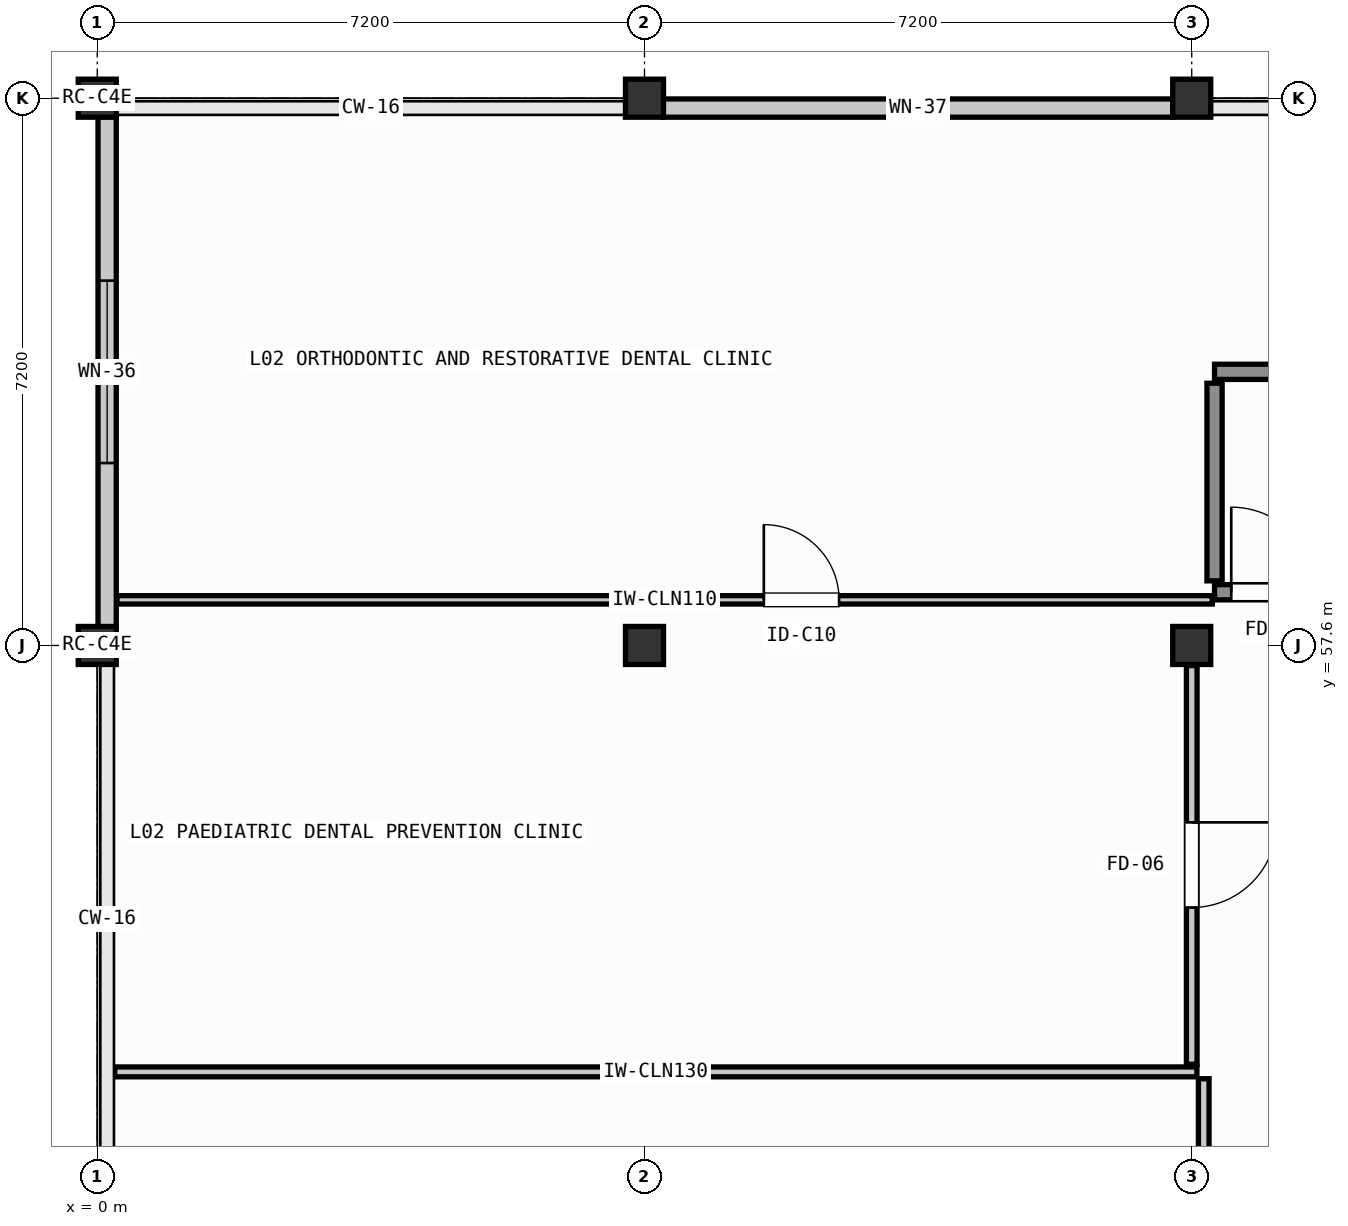
"""IFC4 building model, lengths in metres.
Left out: names, types, materials, properties, quantities, classifications, styles, units other than length and angle.
Written with IfcOpenShell. Run it as: python <this file> out.ifc"""

import sys

from ifc_helpers import new_model, si_unit, direction, frame, frame_2d, origin, origin_2d, place, context, subcontext, project, spatial, rectangle, extrude, element, fill, save


model = new_model("IFC4")
c1 = context("Model", 3, precision=1e-05, world=origin(), true_north=direction((0.0, 1.0)))
c2 = subcontext(c1, "Body", "Model", "MODEL_VIEW")
j1 = project(units=[si_unit("LENGTHUNIT", "METRE"), si_unit("PLANEANGLEUNIT", "RADIAN")], contexts=[c1])
p1 = place(None, origin())
s1 = spatial("IfcSite", under=j1, at=p1, CompositionType="ELEMENT")
p2 = place(p1, origin())
s2 = spatial("IfcBuilding", under=s1, at=p2, CompositionType="ELEMENT")
p3 = place(p2, frame((0.0, 0.0, 4.8)))
s3 = spatial("IfcBuildingStorey", under=s2, at=p3, CompositionType="ELEMENT", Elevation=4.8)
for number, where, z_axis, x_axis in (
    (1, (0.0, 57.6, 0.0), (0.0, 0.0, 1.0), (1.0, 0.0, 0.0)),
    (2, (0.0, 64.8, 0.0), (0.0, 0.0, 1.0), (1.0, 0.0, 0.0)),
    (3, (7.2, 57.6, 0.0), (0.0, 0.0, 1.0), (1.0, 0.0, 0.0)),
    (4, (7.2, 64.8, 0.0), (0.0, 0.0, 1.0), (1.0, 0.0, 0.0)),
    (5, (14.4, 57.6, 0.0), (0.0, 0.0, 1.0), (1.0, 0.0, 0.0)),
    (6, (14.4, 64.8, 0.0), (0.0, 0.0, 1.0), (1.0, 0.0, 0.0)),
):
    element("IfcColumn", number, at=place(p3, frame(where, z_axis=z_axis, x_axis=x_axis)), inside=s3, PredefinedType="COLUMN", context=c2, shape_type="SweptSolid", body=[
        extrude(rectangle(XDim=0.5, YDim=0.5, at=origin_2d()), origin(), (0.0, 0.0, 1.0), 4.2),
    ])
p4 = place(p3, frame((0.13, 57.845, 0.0), z_axis=(0.0, 0.0, 1.0), x_axis=(0.0, 1.0, 0.0)))
e7 = element("IfcWall", 7, at=p4, inside=s3, PredefinedType="SOLIDWALL", context=c2, shape_type="SweptSolid", body=[
    extrude(rectangle(XDim=6.71, YDim=0.24, at=frame_2d((3.355, 0.0))), origin(), (0.0, 0.0, 1.0), 3.4),
])
p5 = place(p4, frame((2.155, 0.0, 0.95)))
e8 = element("IfcOpeningElement", 8, at=p5, cuts=e7, PredefinedType="OPENING", context=c2, shape_type="SweptSolid", body=[
    extrude(rectangle(XDim=2.4, YDim=1.25, at=frame_2d((1.2, 0.625))), frame((0.0, 0.13, 0.0), z_axis=(0.0, -1.0, 0.0), x_axis=(1.0, 0.0, 0.0)), (0.0, 0.0, 1.0), 0.26),
])
p6 = place(p3, frame((7.445, 64.67, 0.0), z_axis=(0.0, 0.0, 1.0), x_axis=(1.0, 0.0, 0.0)))
e9 = element("IfcWall", 9, at=p6, inside=s3, PredefinedType="SOLIDWALL", context=c2, shape_type="SweptSolid", body=[
    extrude(rectangle(XDim=6.71, YDim=0.24, at=frame_2d((3.355, 0.0))), origin(), (0.0, 0.0, 1.0), 3.4),
])
p7 = place(p6, frame((2.98, 0.0, 0.95)))
e10 = element("IfcOpeningElement", 10, at=p7, cuts=e9, PredefinedType="OPENING", context=c2, shape_type="SweptSolid", body=[
    extrude(rectangle(XDim=0.75, YDim=1.55, at=frame_2d((0.375, 0.775))), frame((0.0, 0.13, 0.0), z_axis=(0.0, -1.0, 0.0), x_axis=(1.0, 0.0, 0.0)), (0.0, 0.0, 1.0), 0.26),
])
p8 = place(p3, frame((14.7, 58.3, 0.0), z_axis=(0.0, 0.0, 1.0), x_axis=(1.0, 0.0, 0.0)))
e11 = element("IfcWall", 11, at=p8, inside=s3, PredefinedType="SHEAR", context=c2, shape_type="SweptSolid", body=[
    extrude(rectangle(XDim=6.775, YDim=0.2, at=frame_2d((3.388, 0.0))), origin(), (0.0, 0.0, 1.0), 4.5),
])
p9 = place(p8, frame((0.22, 0.0, 0.0)))
e12 = element("IfcOpeningElement", 12, at=p9, cuts=e11, PredefinedType="OPENING", context=c2, shape_type="SweptSolid", body=[
    extrude(rectangle(XDim=1.12, YDim=2.14, at=frame_2d((0.56, 1.07))), frame((0.0, 0.11, 0.0), z_axis=(0.0, -1.0, 0.0), x_axis=(1.0, 0.0, 0.0)), (0.0, 0.0, 1.0), 0.22),
])
p10 = place(p3, frame((14.7, 61.2, 0.0), z_axis=(0.0, 0.0, 1.0), x_axis=(1.0, 0.0, 0.0)))
e13 = element("IfcWall", 13, at=p10, inside=s3, PredefinedType="SHEAR", context=c2, shape_type="SweptSolid", body=[
    extrude(rectangle(XDim=6.775, YDim=0.2, at=frame_2d((3.388, 0.0))), origin(), (0.0, 0.0, 1.0), 4.5),
])
p11 = place(p3, frame((14.7, 58.45, 0.0), z_axis=(0.0, 0.0, 1.0), x_axis=(0.0, 1.0, 0.0)))
e14 = element("IfcWall", 14, at=p11, inside=s3, PredefinedType="SHEAR", context=c2, shape_type="SweptSolid", body=[
    extrude(rectangle(XDim=2.6, YDim=0.2, at=frame_2d((1.3, 0.0))), origin(), (0.0, 0.0, 1.0), 4.5),
])
p12 = place(p3, frame((0.23, 51.99, 0.0), z_axis=(0.0, 0.0, 1.0), x_axis=(1.0, 0.0, 0.0)))
e15 = element("IfcWall", 15, at=p12, inside=s3, PredefinedType="PARTITIONING", context=c2, shape_type="SweptSolid", body=[
    extrude(rectangle(XDim=14.238, YDim=0.13, at=frame_2d((7.119, 0.0))), origin(), (0.0, 0.0, 1.0), 3.5),
])
p13 = place(p3, frame((14.558, 51.9, 0.0), z_axis=(0.0, 0.0, 1.0), x_axis=(0.0, -1.0, 0.0)))
e16 = element("IfcWall", 16, at=p13, inside=s3, PredefinedType="PARTITIONING", context=c2, shape_type="SweptSolid", body=[
    extrude(rectangle(XDim=1.235, YDim=0.14, at=frame_2d((0.617, 0.0))), origin(), (0.0, 0.0, 1.0), 3.4),
])
p14 = place(p3, frame((0.26, 58.2, 0.0), z_axis=(0.0, 0.0, 1.0), x_axis=(1.0, 0.0, 0.0)))
e17 = element("IfcWall", 17, at=p14, inside=s3, PredefinedType="PARTITIONING", context=c2, shape_type="SweptSolid", body=[
    extrude(rectangle(XDim=14.41, YDim=0.11, at=frame_2d((7.205, 0.0))), origin(), (0.0, 0.0, 1.0), 3.5),
])
p15 = place(p14, frame((8.51, 0.0, 0.0)))
e18 = element("IfcOpeningElement", 18, at=p15, cuts=e17, PredefinedType="OPENING", context=c2, shape_type="SweptSolid", body=[
    extrude(rectangle(XDim=0.99, YDim=2.12, at=frame_2d((0.495, 1.06))), frame((0.0, 0.065, 0.0), z_axis=(0.0, -1.0, 0.0), x_axis=(1.0, 0.0, 0.0)), (0.0, 0.0, 1.0), 0.13),
])
p16 = place(p3, frame((14.4, 57.335, 0.0), z_axis=(0.0, 0.0, 1.0), x_axis=(0.0, -1.0, 0.0)))
e19 = element("IfcWall", 19, at=p16, inside=s3, PredefinedType="PARTITIONING", context=c2, shape_type="SweptSolid", body=[
    extrude(rectangle(XDim=5.245, YDim=0.14, at=frame_2d((2.623, 0.0))), origin(), (0.0, 0.0, 1.0), 3.4),
])
p17 = place(p16, frame((2.062, 0.0, 0.0)))
e20 = element("IfcOpeningElement", 20, at=p17, cuts=e19, PredefinedType="OPENING", context=c2, shape_type="SweptSolid", body=[
    extrude(rectangle(XDim=1.12, YDim=2.14, at=frame_2d((0.56, 1.07))), frame((0.0, 0.08, 0.0), z_axis=(0.0, -1.0, 0.0), x_axis=(1.0, 0.0, 0.0)), (0.0, 0.0, 1.0), 0.16),
])
p18 = place(p5, origin())
e21 = element("IfcWindow", 21, at=p18, inside=s3, PartitioningType="SINGLE_PANEL", PredefinedType="WINDOW", context=c2, shape_type="SweptSolid", body=[
    extrude(rectangle(XDim=2.4, YDim=1.25, at=frame_2d((1.2, 0.625))), frame((0.0, 0.03, 0.0), z_axis=(0.0, -1.0, 0.0), x_axis=(1.0, 0.0, 0.0)), (0.0, 0.0, 1.0), 0.06),
])
fill(e8, e21)
p19 = place(p7, origin())
e22 = element("IfcWindow", 22, at=p19, inside=s3, PartitioningType="SINGLE_PANEL", PredefinedType="WINDOW", context=c2, shape_type="SweptSolid", body=[
    extrude(rectangle(XDim=0.75, YDim=1.55, at=frame_2d((0.375, 0.775))), frame((0.0, 0.03, 0.0), z_axis=(0.0, -1.0, 0.0), x_axis=(1.0, 0.0, 0.0)), (0.0, 0.0, 1.0), 0.06),
])
fill(e10, e22)
p20 = place(p9, origin())
e23 = element("IfcDoor", 23, at=p20, inside=s3, OperationType="SINGLE_SWING_LEFT", PredefinedType="DOOR", context=c2, shape_type="SweptSolid", body=[
    extrude(rectangle(XDim=1.12, YDim=2.14, at=frame_2d((0.56, 1.07))), frame((0.0, 0.025, 0.0), z_axis=(0.0, -1.0, 0.0), x_axis=(1.0, 0.0, 0.0)), (0.0, 0.0, 1.0), 0.05),
])
fill(e12, e23)
p21 = place(p17, origin())
e24 = element("IfcDoor", 24, at=p21, inside=s3, OperationType="SINGLE_SWING_LEFT", PredefinedType="DOOR", context=c2, shape_type="SweptSolid", body=[
    extrude(rectangle(XDim=1.12, YDim=2.14, at=frame_2d((0.56, 1.07))), frame((0.0, 0.025, 0.0), z_axis=(0.0, -1.0, 0.0), x_axis=(1.0, 0.0, 0.0)), (0.0, 0.0, 1.0), 0.05),
])
fill(e20, e24)
p22 = place(p15, origin())
e25 = element("IfcDoor", 25, at=p22, inside=s3, OperationType="SINGLE_SWING_RIGHT", PredefinedType="DOOR", context=c2, shape_type="SweptSolid", body=[
    extrude(rectangle(XDim=0.99, YDim=2.12, at=frame_2d((0.495, 1.06))), frame((0.0, 0.025, 0.0), z_axis=(0.0, -1.0, 0.0), x_axis=(1.0, 0.0, 0.0)), (0.0, 0.0, 1.0), 0.05),
])
fill(e18, e25)
save(model, sys.argv[1])
